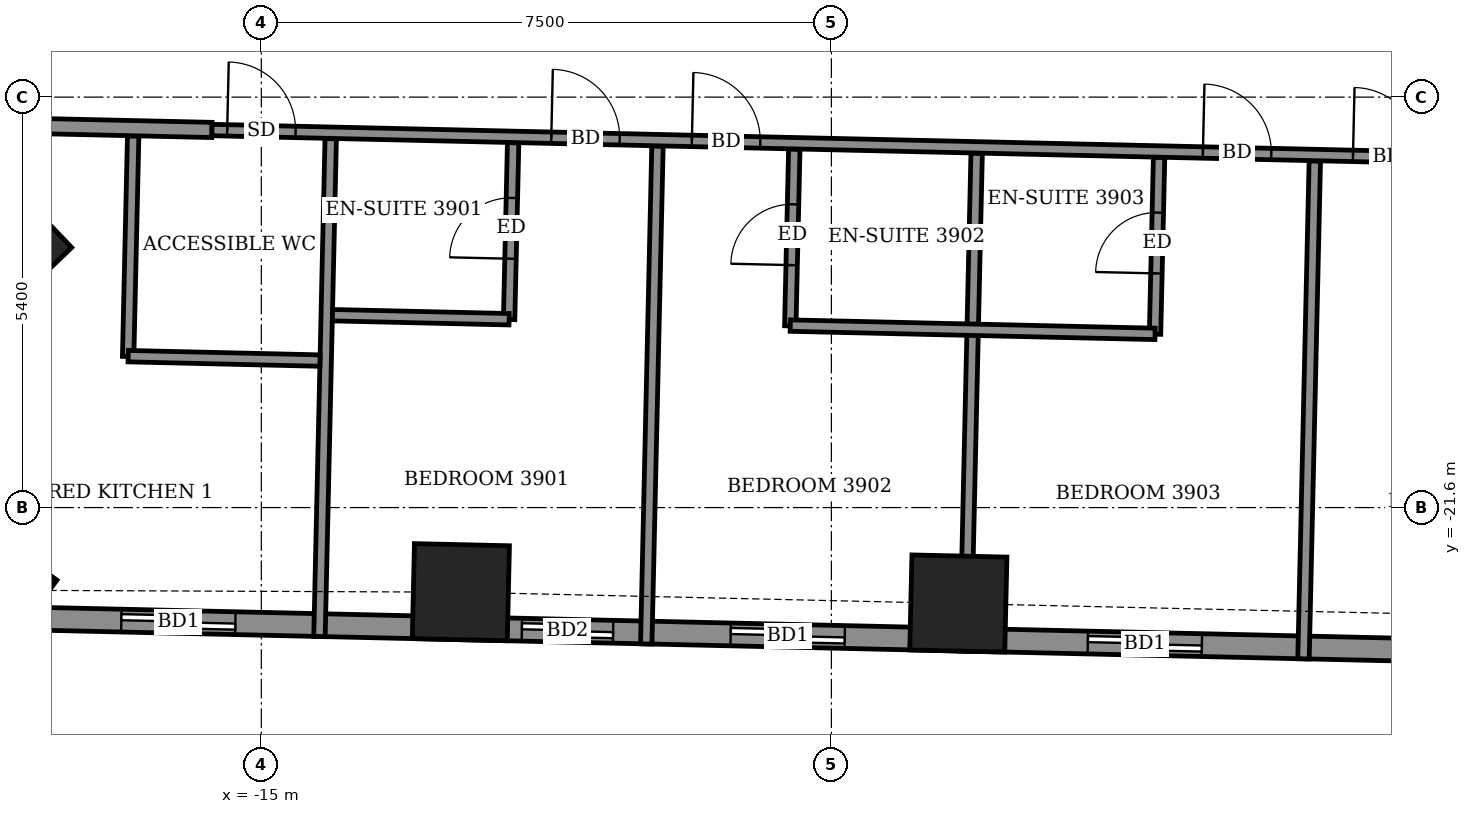
"""IFC4 building model, lengths in metres.
Left out: names, types, materials, properties, quantities, classifications, styles, units other than length and angle.
Written with IfcOpenShell. Run it as: python <this file> out.ifc"""

import sys

from ifc_helpers import new_model, si_unit, direction, frame, frame_2d, origin, origin_2d, place, context, subcontext, project, spatial, rectangle, extrude, element, fill, save


model = new_model("IFC4")
c1 = context("Model", 3, precision=1e-05, world=origin(), true_north=direction((0.0, 1.0)))
c2 = subcontext(c1, "Body", "Model", "MODEL_VIEW")
j1 = project(units=[si_unit("LENGTHUNIT", "METRE"), si_unit("PLANEANGLEUNIT", "RADIAN")], contexts=[c1])
p1 = place(None, origin())
s1 = spatial("IfcSite", under=j1, at=p1, CompositionType="ELEMENT")
p2 = place(p1, origin())
s2 = spatial("IfcBuilding", under=s1, at=p2, CompositionType="ELEMENT")
p3 = place(p2, frame((0.0, 0.0, 156.3)))
s3 = spatial("IfcBuildingStorey", under=s2, at=p3, CompositionType="ELEMENT", Elevation=156.3)
for number, where, z_axis, x_axis in (
    (1, (-18.378, -18.159, -0.55), (0.0, 0.0, 1.0), (0.691, -0.723, 0.0)),
    (2, (-18.563, -22.687, -0.55), (0.0, 0.0, 1.0), (0.805, -0.593, 0.0)),
    (3, (-12.375, -22.713, -0.55), (0.0, 0.0, 1.0), (1.0, -0.023, 0.0)),
    (4, (-5.83, -22.862, -0.55), (0.0, 0.0, 1.0), (1.0, -0.023, 0.0)),
):
    element("IfcColumn", number, at=place(p3, frame(where, z_axis=z_axis, x_axis=x_axis)), inside=s3, PredefinedType="COLUMN", context=c2, shape_type="SweptSolid", body=[
        extrude(rectangle(XDim=1.25, YDim=1.25, at=origin_2d()), origin(), (0.0, 0.0, 1.0), 3.6),
    ])
p4 = place(p3, frame((-18.781, -23.043, 0.0), z_axis=(0.0, 0.0, 1.0), x_axis=(0.999742794992, -0.022679150367, 0.0)))
e5 = element("IfcWall", 5, at=p4, inside=s3, PredefinedType="SOLIDWALL", context=c2, shape_type="SweptSolid", body=[
    extrude(rectangle(XDim=38.98, YDim=0.3, at=frame_2d((19.49, 0.0))), origin(), (0.0, 0.0, 1.0), 3.05),
])
p5 = place(p4, frame((1.94, 0.0, 0.0)))
e6 = element("IfcOpeningElement", 6, at=p5, cuts=e5, PredefinedType="OPENING", context=c2, shape_type="SweptSolid", body=[
    extrude(rectangle(XDim=1.5, YDim=2.4, at=frame_2d((0.75, 1.2))), frame((0.0, 0.16, 0.0), z_axis=(0.0, -1.0, 0.0), x_axis=(1.0, 0.0, 0.0)), (0.0, 0.0, 1.0), 0.32),
])
p6 = place(p4, frame((7.211, 0.0, 0.0)))
e7 = element("IfcOpeningElement", 7, at=p6, cuts=e5, PredefinedType="OPENING", context=c2, shape_type="SweptSolid", body=[
    extrude(rectangle(XDim=1.2, YDim=2.4, at=frame_2d((0.6, 1.2))), frame((0.0, 0.16, 0.0), z_axis=(0.0, -1.0, 0.0), x_axis=(1.0, 0.0, 0.0)), (0.0, 0.0, 1.0), 0.32),
])
p7 = place(p4, frame((9.959, 0.0, 0.0)))
e8 = element("IfcOpeningElement", 8, at=p7, cuts=e5, PredefinedType="OPENING", context=c2, shape_type="SweptSolid", body=[
    extrude(rectangle(XDim=1.5, YDim=2.4, at=frame_2d((0.75, 1.2))), frame((0.0, 0.16, 0.0), z_axis=(0.0, -1.0, 0.0), x_axis=(1.0, 0.0, 0.0)), (0.0, 0.0, 1.0), 0.32),
])
p8 = place(p4, frame((14.659, 0.0, 0.0)))
e9 = element("IfcOpeningElement", 9, at=p8, cuts=e5, PredefinedType="OPENING", context=c2, shape_type="SweptSolid", body=[
    extrude(rectangle(XDim=1.5, YDim=2.4, at=frame_2d((0.75, 1.2))), frame((0.0, 0.16, 0.0), z_axis=(0.0, -1.0, 0.0), x_axis=(1.0, 0.0, 0.0)), (0.0, 0.0, 1.0), 0.32),
])
p9 = place(p4, frame((20.232, 0.0, 0.0)))
e10 = element("IfcOpeningElement", 10, at=p9, cuts=e5, PredefinedType="OPENING", context=c2, shape_type="SweptSolid", body=[
    extrude(rectangle(XDim=1.2, YDim=2.4, at=frame_2d((0.6, 1.2))), frame((0.0, 0.16, 0.0), z_axis=(0.0, -1.0, 0.0), x_axis=(1.0, 0.0, 0.0)), (0.0, 0.0, 1.0), 0.32),
])
p10 = place(p4, frame((22.981, 0.0, 0.0)))
e11 = element("IfcOpeningElement", 11, at=p10, cuts=e5, PredefinedType="OPENING", context=c2, shape_type="SweptSolid", body=[
    extrude(rectangle(XDim=1.5, YDim=2.4, at=frame_2d((0.75, 1.2))), frame((0.0, 0.16, 0.0), z_axis=(0.0, -1.0, 0.0), x_axis=(1.0, 0.0, 0.0)), (0.0, 0.0, 1.0), 0.32),
])
p11 = place(p4, frame((27.681, 0.0, 0.0)))
e12 = element("IfcOpeningElement", 12, at=p11, cuts=e5, PredefinedType="OPENING", context=c2, shape_type="SweptSolid", body=[
    extrude(rectangle(XDim=1.5, YDim=2.4, at=frame_2d((0.75, 1.2))), frame((0.0, 0.16, 0.0), z_axis=(0.0, -1.0, 0.0), x_axis=(1.0, 0.0, 0.0)), (0.0, 0.0, 1.0), 0.32),
])
p12 = place(p4, frame((30.654, 0.0, 0.0)))
e13 = element("IfcOpeningElement", 13, at=p12, cuts=e5, PredefinedType="OPENING", context=c2, shape_type="SweptSolid", body=[
    extrude(rectangle(XDim=1.2, YDim=2.4, at=frame_2d((0.6, 1.2))), frame((0.0, 0.16, 0.0), z_axis=(0.0, -1.0, 0.0), x_axis=(1.0, 0.0, 0.0)), (0.0, 0.0, 1.0), 0.32),
])
p13 = place(p4, frame((35.176, 0.0, 0.9)))
e14 = element("IfcOpeningElement", 14, at=p13, cuts=e5, PredefinedType="OPENING", context=c2, shape_type="SweptSolid", body=[
    extrude(rectangle(XDim=2.4, YDim=1.5, at=frame_2d((1.2, 0.75))), frame((0.0, 0.16, 0.0), z_axis=(0.0, -1.0, 0.0), x_axis=(1.0, 0.0, 0.0)), (0.0, 0.0, 1.0), 0.32),
])
p14 = place(p3, frame((-14.235, -23.296, 0.0), z_axis=(0.0, 0.0, 1.0), x_axis=(0.022623197363, 0.999744062719, 0.0)))
e15 = element("IfcWall", 15, at=p14, inside=s3, PredefinedType="PARTITIONING", context=c2, shape_type="SweptSolid", body=[
    extrude(rectangle(XDim=6.551, YDim=0.15, at=frame_2d((3.275, 0.0))), origin(), (0.0, 0.0, 1.0), 2.55),
])
p15 = place(p3, frame((-9.936, -23.394, 0.0), z_axis=(0.0, 0.0, 1.0), x_axis=(0.022585104341, 0.999744923999, 0.0)))
e16 = element("IfcWall", 16, at=p15, inside=s3, PredefinedType="PARTITIONING", context=c2, shape_type="SweptSolid", body=[
    extrude(rectangle(XDim=6.551, YDim=0.15, at=frame_2d((3.275, 0.0))), origin(), (0.0, 0.0, 1.0), 2.55),
])
p16 = place(p3, frame((-5.737, -23.489, 0.0), z_axis=(0.0, 0.0, 1.0), x_axis=(0.022585104341, 0.999744923999, 0.0)))
e17 = element("IfcWall", 17, at=p16, inside=s3, PredefinedType="PARTITIONING", context=c2, shape_type="SweptSolid", body=[
    extrude(rectangle(XDim=6.551, YDim=0.15, at=frame_2d((3.275, 0.0))), origin(), (0.0, 0.0, 1.0), 3.05),
])
p17 = place(p3, frame((-1.289, -23.59, 0.0), z_axis=(0.0, 0.0, 1.0), x_axis=(0.022771353855, 0.999740699103, 0.0)))
e18 = element("IfcWall", 18, at=p17, inside=s3, PredefinedType="PARTITIONING", context=c2, shape_type="SweptSolid", body=[
    extrude(rectangle(XDim=6.551, YDim=0.15, at=frame_2d((3.275, 0.0))), origin(), (0.0, 0.0, 1.0), 2.55),
])
p18 = place(p3, frame((-16.752, -19.612, 0.0), z_axis=(0.0, 0.0, 1.0), x_axis=(0.022730967319, 0.999741618182, 0.0)))
e19 = element("IfcWall", 19, at=p18, inside=s3, PredefinedType="PARTITIONING", context=c2, shape_type="SweptSolid", body=[
    extrude(rectangle(XDim=2.9, YDim=0.15, at=frame_2d((1.45, 0.0))), origin(), (0.0, 0.0, 1.0), 3.05),
])
p19 = place(p3, frame((-16.752, -19.608, 0.0), z_axis=(0.0, 0.0, 1.0), x_axis=(0.999735102249, -0.023015762656, 0.0)))
e20 = element("IfcWall", 20, at=p19, inside=s3, PredefinedType="PARTITIONING", context=c2, shape_type="SweptSolid", body=[
    extrude(rectangle(XDim=2.525, YDim=0.15, at=frame_2d((1.262, 0.0))), origin(), (0.0, 0.0, 1.0), 3.05),
])
p20 = place(p3, frame((-11.74, -19.126, 0.0), z_axis=(0.0, 0.0, 1.0), x_axis=(0.022781023197, 0.999740478815, 0.0)))
e21 = element("IfcWall", 21, at=p20, inside=s3, PredefinedType="PARTITIONING", context=c2, shape_type="SweptSolid", body=[
    extrude(rectangle(XDim=2.325, YDim=0.15, at=frame_2d((1.163, 0.0))), origin(), (0.0, 0.0, 1.0), 3.05),
])
p21 = place(p20, frame((0.8, 0.0, 0.0)))
e22 = element("IfcOpeningElement", 22, at=p21, cuts=e21, PredefinedType="OPENING", context=c2, shape_type="SweptSolid", body=[
    extrude(rectangle(XDim=0.8, YDim=2.1, at=frame_2d((0.4, 1.05))), frame((0.0, 0.085, 0.0), z_axis=(0.0, -1.0, 0.0), x_axis=(1.0, 0.0, 0.0)), (0.0, 0.0, 1.0), 0.17),
])
p22 = place(p3, frame((-8.041, -19.21, 0.0), z_axis=(0.0, 0.0, 1.0), x_axis=(0.022781023197, 0.999740478815, 0.0)))
e23 = element("IfcWall", 23, at=p22, inside=s3, PredefinedType="PARTITIONING", context=c2, shape_type="SweptSolid", body=[
    extrude(rectangle(XDim=2.325, YDim=0.15, at=frame_2d((1.163, 0.0))), origin(), (0.0, 0.0, 1.0), 3.05),
])
p23 = place(p22, frame((0.8, 0.0, 0.0)))
e24 = element("IfcOpeningElement", 24, at=p23, cuts=e23, PredefinedType="OPENING", context=c2, shape_type="SweptSolid", body=[
    extrude(rectangle(XDim=0.8, YDim=2.1, at=frame_2d((0.4, 1.05))), frame((0.0, 0.085, 0.0), z_axis=(0.0, -1.0, 0.0), x_axis=(1.0, 0.0, 0.0)), (0.0, 0.0, 1.0), 0.17),
])
p24 = place(p3, frame((-3.242, -19.319, 0.0), z_axis=(0.0, 0.0, 1.0), x_axis=(0.022778632478, 0.99974053329, 0.0)))
e25 = element("IfcWall", 25, at=p24, inside=s3, PredefinedType="PARTITIONING", context=c2, shape_type="SweptSolid", body=[
    extrude(rectangle(XDim=2.326, YDim=0.15, at=frame_2d((1.163, 0.0))), origin(), (0.0, 0.0, 1.0), 3.05),
])
p25 = place(p24, frame((0.8, 0.0, 0.0)))
e26 = element("IfcOpeningElement", 26, at=p25, cuts=e25, PredefinedType="OPENING", context=c2, shape_type="SweptSolid", body=[
    extrude(rectangle(XDim=0.8, YDim=2.1, at=frame_2d((0.4, 1.05))), frame((0.0, 0.085, 0.0), z_axis=(0.0, -1.0, 0.0), x_axis=(1.0, 0.0, 0.0)), (0.0, 0.0, 1.0), 0.17),
])
p26 = place(p3, frame((-14.064, -19.069, 0.0), z_axis=(0.0, 0.0, 1.0), x_axis=(0.999740260747, -0.02279059109, 0.0)))
e27 = element("IfcWall", 27, at=p26, inside=s3, PredefinedType="PARTITIONING", context=c2, shape_type="SweptSolid", body=[
    extrude(rectangle(XDim=2.324, YDim=0.15, at=frame_2d((1.162, 0.0))), origin(), (0.0, 0.0, 1.0), 3.05),
])
p27 = place(p3, frame((-8.041, -19.206, 0.0), z_axis=(0.0, 0.0, 1.0), x_axis=(0.999742701292, -0.022683280499, 0.0)))
e28 = element("IfcWall", 28, at=p27, inside=s3, PredefinedType="PARTITIONING", context=c2, shape_type="SweptSolid", body=[
    extrude(rectangle(XDim=4.8, YDim=0.15, at=frame_2d((2.4, 0.0))), origin(), (0.0, 0.0, 1.0), 3.05),
])
p28 = place(p3, frame((-21.983, -16.489, 0.0), z_axis=(0.0, 0.0, 1.0), x_axis=(0.999744930163, -0.022584831499, 0.0)))
e29 = element("IfcWall", 29, at=p28, inside=s3, PredefinedType="PARTITIONING", context=c2, shape_type="SweptSolid", body=[
    extrude(rectangle(XDim=6.335, YDim=0.2, at=frame_2d((3.167, 0.0))), origin(), (0.0, 0.0, 1.0), 3.05),
])
p29 = place(p28, frame((1.45, 0.0, 0.0)))
e30 = element("IfcOpeningElement", 30, at=p29, cuts=e29, PredefinedType="OPENING", context=c2, shape_type="SweptSolid", body=[
    extrude(rectangle(XDim=1.0, YDim=2.1, at=frame_2d((0.5, 1.05))), frame((0.0, 0.11, 0.0), z_axis=(0.0, -1.0, 0.0), x_axis=(1.0, 0.0, 0.0)), (0.0, 0.0, 1.0), 0.22),
])
p30 = place(p3, frame((-15.649, -16.633, 0.0), z_axis=(0.0, 0.0, 1.0), x_axis=(0.999743261737, -0.022658565952, 0.0)))
e31 = element("IfcWall", 31, at=p30, inside=s3, PredefinedType="PARTITIONING", context=c2, shape_type="SweptSolid", body=[
    extrude(rectangle(XDim=30.536, YDim=0.15, at=frame_2d((15.268, 0.0))), origin(), (0.0, 0.0, 1.0), 3.05),
])
p31 = place(p30, frame((0.2, 0.0, 0.0)))
e32 = element("IfcOpeningElement", 32, at=p31, cuts=e31, PredefinedType="OPENING", context=c2, shape_type="SweptSolid", body=[
    extrude(rectangle(XDim=0.9, YDim=2.1, at=frame_2d((0.45, 1.05))), frame((0.0, 0.085, 0.0), z_axis=(0.0, -1.0, 0.0), x_axis=(1.0, 0.0, 0.0)), (0.0, 0.0, 1.0), 0.17),
])
p32 = place(p30, frame((4.465, 0.0, 0.0)))
e33 = element("IfcOpeningElement", 33, at=p32, cuts=e31, PredefinedType="OPENING", context=c2, shape_type="SweptSolid", body=[
    extrude(rectangle(XDim=0.9, YDim=2.1, at=frame_2d((0.45, 1.05))), frame((0.0, 0.085, 0.0), z_axis=(0.0, -1.0, 0.0), x_axis=(1.0, 0.0, 0.0)), (0.0, 0.0, 1.0), 0.17),
])
p33 = place(p30, frame((6.315, 0.0, 0.0)))
e34 = element("IfcOpeningElement", 34, at=p33, cuts=e31, PredefinedType="OPENING", context=c2, shape_type="SweptSolid", body=[
    extrude(rectangle(XDim=0.9, YDim=2.1, at=frame_2d((0.45, 1.05))), frame((0.0, 0.085, 0.0), z_axis=(0.0, -1.0, 0.0), x_axis=(1.0, 0.0, 0.0)), (0.0, 0.0, 1.0), 0.17),
])
p34 = place(p30, frame((13.04, 0.0, 0.0)))
e35 = element("IfcOpeningElement", 35, at=p34, cuts=e31, PredefinedType="OPENING", context=c2, shape_type="SweptSolid", body=[
    extrude(rectangle(XDim=0.9, YDim=2.1, at=frame_2d((0.45, 1.05))), frame((0.0, 0.085, 0.0), z_axis=(0.0, -1.0, 0.0), x_axis=(1.0, 0.0, 0.0)), (0.0, 0.0, 1.0), 0.17),
])
p35 = place(p30, frame((15.015, 0.0, 0.0)))
e36 = element("IfcOpeningElement", 36, at=p35, cuts=e31, PredefinedType="OPENING", context=c2, shape_type="SweptSolid", body=[
    extrude(rectangle(XDim=0.9, YDim=2.1, at=frame_2d((0.45, 1.05))), frame((0.0, 0.085, 0.0), z_axis=(0.0, -1.0, 0.0), x_axis=(1.0, 0.0, 0.0)), (0.0, 0.0, 1.0), 0.17),
])
p36 = place(p30, frame((21.74, 0.0, 0.0)))
e37 = element("IfcOpeningElement", 37, at=p36, cuts=e31, PredefinedType="OPENING", context=c2, shape_type="SweptSolid", body=[
    extrude(rectangle(XDim=0.9, YDim=2.1, at=frame_2d((0.45, 1.05))), frame((0.0, 0.085, 0.0), z_axis=(0.0, -1.0, 0.0), x_axis=(1.0, 0.0, 0.0)), (0.0, 0.0, 1.0), 0.17),
])
p37 = place(p30, frame((23.665, 0.0, 0.0)))
e38 = element("IfcOpeningElement", 38, at=p37, cuts=e31, PredefinedType="OPENING", context=c2, shape_type="SweptSolid", body=[
    extrude(rectangle(XDim=0.9, YDim=2.1, at=frame_2d((0.45, 1.05))), frame((0.0, 0.085, 0.0), z_axis=(0.0, -1.0, 0.0), x_axis=(1.0, 0.0, 0.0)), (0.0, 0.0, 1.0), 0.17),
])
p38 = place(p5, origin())
e39 = element("IfcDoor", 39, at=p38, inside=s3, OperationType="SLIDING_TO_LEFT", PredefinedType="DOOR", context=c2, shape_type="SweptSolid", body=[
    extrude(rectangle(XDim=1.5, YDim=2.4, at=frame_2d((0.75, 1.2))), frame((0.0, 0.025, 0.0), z_axis=(0.0, -1.0, 0.0), x_axis=(1.0, 0.0, 0.0)), (0.0, 0.0, 1.0), 0.05),
])
fill(e6, e39)
p39 = place(p6, origin())
e40 = element("IfcDoor", 40, at=p39, inside=s3, OperationType="SLIDING_TO_LEFT", PredefinedType="DOOR", context=c2, shape_type="SweptSolid", body=[
    extrude(rectangle(XDim=1.2, YDim=2.4, at=frame_2d((0.6, 1.2))), frame((0.0, 0.025, 0.0), z_axis=(0.0, -1.0, 0.0), x_axis=(1.0, 0.0, 0.0)), (0.0, 0.0, 1.0), 0.05),
])
fill(e7, e40)
p40 = place(p7, origin())
e41 = element("IfcDoor", 41, at=p40, inside=s3, OperationType="SLIDING_TO_LEFT", PredefinedType="DOOR", context=c2, shape_type="SweptSolid", body=[
    extrude(rectangle(XDim=1.5, YDim=2.4, at=frame_2d((0.75, 1.2))), frame((0.0, 0.025, 0.0), z_axis=(0.0, -1.0, 0.0), x_axis=(1.0, 0.0, 0.0)), (0.0, 0.0, 1.0), 0.05),
])
fill(e8, e41)
p41 = place(p8, origin())
e42 = element("IfcDoor", 42, at=p41, inside=s3, OperationType="SLIDING_TO_LEFT", PredefinedType="DOOR", context=c2, shape_type="SweptSolid", body=[
    extrude(rectangle(XDim=1.5, YDim=2.4, at=frame_2d((0.75, 1.2))), frame((0.0, 0.025, 0.0), z_axis=(0.0, -1.0, 0.0), x_axis=(1.0, 0.0, 0.0)), (0.0, 0.0, 1.0), 0.05),
])
fill(e9, e42)
p42 = place(p31, origin())
e43 = element("IfcDoor", 43, at=p42, inside=s3, OperationType="SINGLE_SWING_LEFT", PredefinedType="DOOR", context=c2, shape_type="SweptSolid", body=[
    extrude(rectangle(XDim=0.9, YDim=2.1, at=frame_2d((0.45, 1.05))), frame((0.0, 0.025, 0.0), z_axis=(0.0, -1.0, 0.0), x_axis=(1.0, 0.0, 0.0)), (0.0, 0.0, 1.0), 0.05),
])
fill(e32, e43)
p43 = place(p32, origin())
e44 = element("IfcDoor", 44, at=p43, inside=s3, OperationType="SINGLE_SWING_LEFT", PredefinedType="DOOR", context=c2, shape_type="SweptSolid", body=[
    extrude(rectangle(XDim=0.9, YDim=2.1, at=frame_2d((0.45, 1.05))), frame((0.0, 0.025, 0.0), z_axis=(0.0, -1.0, 0.0), x_axis=(1.0, 0.0, 0.0)), (0.0, 0.0, 1.0), 0.05),
])
fill(e33, e44)
p44 = place(p21, origin())
e45 = element("IfcDoor", 45, at=p44, inside=s3, OperationType="SINGLE_SWING_LEFT", PredefinedType="DOOR", context=c2, shape_type="SweptSolid", body=[
    extrude(rectangle(XDim=0.8, YDim=2.1, at=frame_2d((0.4, 1.05))), frame((0.0, 0.025, 0.0), z_axis=(0.0, -1.0, 0.0), x_axis=(1.0, 0.0, 0.0)), (0.0, 0.0, 1.0), 0.05),
])
fill(e22, e45)
p45 = place(p33, origin())
e46 = element("IfcDoor", 46, at=p45, inside=s3, OperationType="SINGLE_SWING_RIGHT", PredefinedType="DOOR", context=c2, shape_type="SweptSolid", body=[
    extrude(rectangle(XDim=0.9, YDim=2.1, at=frame_2d((0.45, 1.05))), frame((0.0, 0.025, 0.0), z_axis=(0.0, -1.0, 0.0), x_axis=(1.0, 0.0, 0.0)), (0.0, 0.0, 1.0), 0.05),
])
fill(e34, e46)
p46 = place(p23, origin())
e47 = element("IfcDoor", 47, at=p46, inside=s3, OperationType="SINGLE_SWING_RIGHT", PredefinedType="DOOR", context=c2, shape_type="SweptSolid", body=[
    extrude(rectangle(XDim=0.8, YDim=2.1, at=frame_2d((0.4, 1.05))), frame((0.0, 0.025, 0.0), z_axis=(0.0, -1.0, 0.0), x_axis=(1.0, 0.0, 0.0)), (0.0, 0.0, 1.0), 0.05),
])
fill(e24, e47)
p47 = place(p34, origin())
e48 = element("IfcDoor", 48, at=p47, inside=s3, OperationType="SINGLE_SWING_LEFT", PredefinedType="DOOR", context=c2, shape_type="SweptSolid", body=[
    extrude(rectangle(XDim=0.9, YDim=2.1, at=frame_2d((0.45, 1.05))), frame((0.0, 0.025, 0.0), z_axis=(0.0, -1.0, 0.0), x_axis=(1.0, 0.0, 0.0)), (0.0, 0.0, 1.0), 0.05),
])
fill(e35, e48)
p48 = place(p25, origin())
e49 = element("IfcDoor", 49, at=p48, inside=s3, OperationType="SINGLE_SWING_LEFT", PredefinedType="DOOR", context=c2, shape_type="SweptSolid", body=[
    extrude(rectangle(XDim=0.8, YDim=2.1, at=frame_2d((0.4, 1.05))), frame((0.0, 0.025, 0.0), z_axis=(0.0, -1.0, 0.0), x_axis=(1.0, 0.0, 0.0)), (0.0, 0.0, 1.0), 0.05),
])
fill(e26, e49)
p49 = place(p35, origin())
e50 = element("IfcDoor", 50, at=p49, inside=s3, OperationType="SINGLE_SWING_RIGHT", PredefinedType="DOOR", context=c2, shape_type="SweptSolid", body=[
    extrude(rectangle(XDim=0.9, YDim=2.1, at=frame_2d((0.45, 1.05))), frame((0.0, 0.025, 0.0), z_axis=(0.0, -1.0, 0.0), x_axis=(1.0, 0.0, 0.0)), (0.0, 0.0, 1.0), 0.05),
])
fill(e36, e50)
save(model, sys.argv[1])
